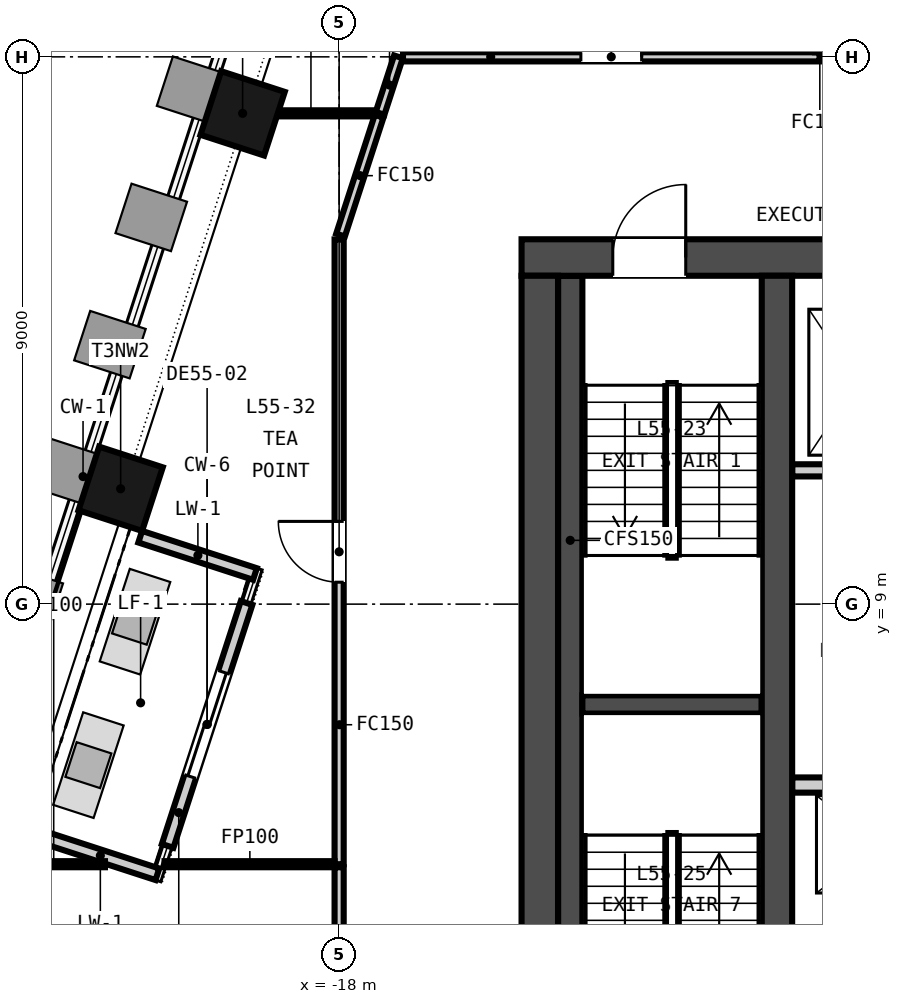
"""IFC4 building model, lengths in metres.
Left out: names, types, materials, properties, quantities, classifications, styles, units other than length and angle.
Written with IfcOpenShell. Run it as: python <this file> out.ifc"""

import sys

from ifc_helpers import new_model, si_unit, direction, frame, frame_2d, origin, origin_2d, place, context, subcontext, project, spatial, rectangle, extrude, element, fill, save


model = new_model("IFC4")
c1 = context("Model", 3, precision=1e-05, world=origin(), true_north=direction((0.0, 1.0)))
c2 = subcontext(c1, "Body", "Model", "MODEL_VIEW")
j1 = project(units=[si_unit("LENGTHUNIT", "METRE"), si_unit("PLANEANGLEUNIT", "RADIAN")], contexts=[c1])
p1 = place(None, origin())
s1 = spatial("IfcSite", under=j1, at=p1, CompositionType="ELEMENT")
p2 = place(p1, origin())
s2 = spatial("IfcBuilding", under=s1, at=p2, CompositionType="ELEMENT")
p3 = place(p2, frame((0.0, 0.0, 219.95)))
s3 = spatial("IfcBuildingStorey", under=s2, at=p3, CompositionType="ELEMENT", Elevation=219.95)
p4 = place(p3, frame((-15.0, 14.7, -0.15), z_axis=(0.0, 0.0, 1.0), x_axis=(1.0, 0.0, 0.0)))
e1 = element("IfcWall", 1, at=p4, inside=s3, PredefinedType="SOLIDWALL", context=c2, shape_type="SweptSolid", body=[
    extrude(rectangle(XDim=30.0, YDim=0.6, at=frame_2d((15.0, 0.0))), origin(), (0.0, 0.0, 1.0), 3.65),
])
p5 = place(p4, frame((9.25, 0.0, 0.15)))
e2 = element("IfcOpeningElement", 2, at=p5, cuts=e1, PredefinedType="OPENING", context=c2, shape_type="SweptSolid", body=[
    extrude(rectangle(XDim=1.5, YDim=2.1, at=frame_2d((0.75, 1.05))), frame((0.0, 0.31, 0.0), z_axis=(0.0, -1.0, 0.0), x_axis=(1.0, 0.0, 0.0)), (0.0, 0.0, 1.0), 0.62),
])
p6 = place(p4, frame((19.4, 0.0, 0.15)))
e3 = element("IfcOpeningElement", 3, at=p6, cuts=e1, PredefinedType="OPENING", context=c2, shape_type="SweptSolid", body=[
    extrude(rectangle(XDim=1.5, YDim=2.1, at=frame_2d((0.75, 1.05))), frame((0.0, 0.31, 0.0), z_axis=(0.0, -1.0, 0.0), x_axis=(1.0, 0.0, 0.0)), (0.0, 0.0, 1.0), 0.62),
])
p7 = place(p4, frame((1.5, 0.0, 0.15)))
e4 = element("IfcOpeningElement", 4, at=p7, cuts=e1, PredefinedType="OPENING", context=c2, shape_type="SweptSolid", body=[
    extrude(rectangle(XDim=1.2, YDim=2.1, at=frame_2d((0.6, 1.05))), frame((0.0, 0.31, 0.0), z_axis=(0.0, -1.0, 0.0), x_axis=(1.0, 0.0, 0.0)), (0.0, 0.0, 1.0), 0.62),
])
p8 = place(p4, frame((27.3, 0.0, 0.15)))
e5 = element("IfcOpeningElement", 5, at=p8, cuts=e1, PredefinedType="OPENING", context=c2, shape_type="SweptSolid", body=[
    extrude(rectangle(XDim=1.2, YDim=2.1, at=frame_2d((0.6, 1.05))), frame((0.0, 0.31, 0.0), z_axis=(0.0, -1.0, 0.0), x_axis=(1.0, 0.0, 0.0)), (0.0, 0.0, 1.0), 0.62),
])
p9 = place(p3, frame((-14.7, 0.6, -0.15), z_axis=(0.0, 0.0, 1.0), x_axis=(0.0, 1.0, 0.0)))
e6 = element("IfcWall", 6, at=p9, inside=s3, PredefinedType="SOLIDWALL", context=c2, shape_type="SweptSolid", body=[
    extrude(rectangle(XDim=13.8, YDim=0.6, at=frame_2d((6.9, 0.0))), origin(), (0.0, 0.0, 1.0), 3.65),
])
p10 = place(p3, frame((-10.8, 0.6, -0.15), z_axis=(0.0, 0.0, 1.0), x_axis=(0.0, 1.0, 0.0)))
e7 = element("IfcWall", 7, at=p10, inside=s3, PredefinedType="SOLIDWALL", context=c2, shape_type="SweptSolid", body=[
    extrude(rectangle(XDim=13.8, YDim=0.5, at=frame_2d((6.9, 0.0))), origin(), (0.0, 0.0, 1.0), 3.65),
])
for number, where, z_axis, x_axis in (
    (8, (-19.587, 17.071, -0.15), (0.0, 0.0, 1.0), (-0.309, -0.951, 0.0)),
    (9, (-21.593, 10.897, -0.15), (0.0, 0.0, 1.0), (-0.309, -0.951, 0.0)),
):
    element("IfcColumn", number, at=place(p3, frame(where, z_axis=z_axis, x_axis=x_axis)), inside=s3, PredefinedType="COLUMN", context=c2, shape_type="SweptSolid", body=[
        extrude(rectangle(XDim=1.1, YDim=1.1, at=origin_2d()), origin(), (0.0, 0.0, 1.0), 3.65),
    ])
p11 = place(p3, frame((-19.522, 9.019, 0.0), z_axis=(0.0, 0.0, 1.0), x_axis=(-0.30901640812, -0.951056706781, 0.0)))
e10 = element("IfcWall", 10, at=p11, inside=s3, PredefinedType="SOLIDWALL", context=c2, shape_type="SweptSolid", body=[
    extrude(rectangle(XDim=4.2, YDim=0.2, at=frame_2d((2.1, 0.0))), origin(), (0.0, 0.0, 1.0), 2.9),
])
p12 = place(p11, frame((1.2, 0.0, 0.0)))
e11 = element("IfcOpeningElement", 11, at=p12, cuts=e10, PredefinedType="OPENING", context=c2, shape_type="SweptSolid", body=[
    extrude(rectangle(XDim=1.8, YDim=2.4, at=frame_2d((0.9, 1.2))), frame((0.0, 0.11, 0.0), z_axis=(0.0, -1.0, 0.0), x_axis=(1.0, 0.0, 0.0)), (0.0, 0.0, 1.0), 0.22),
])
p13 = place(p3, frame((-21.271, 10.109, 0.0), z_axis=(0.0, 0.0, 1.0), x_axis=(0.951019598045, -0.309130593981, 0.0)))
e12 = element("IfcWall", 12, at=p13, inside=s3, PredefinedType="SOLIDWALL", context=c2, shape_type="SweptSolid", body=[
    extrude(rectangle(XDim=1.984, YDim=0.2, at=frame_2d((0.992, 0.0))), origin(), (0.0, 0.0, 1.0), 3.05),
])
p14 = place(p3, frame((-22.875, 5.171, 0.0), z_axis=(0.0, 0.0, 1.0), x_axis=(0.951067521568, -0.308983121576, 0.0)))
e13 = element("IfcWall", 13, at=p14, inside=s3, PredefinedType="SOLIDWALL", context=c2, shape_type="SweptSolid", body=[
    extrude(rectangle(XDim=1.984, YDim=0.2, at=frame_2d((0.992, 0.0))), origin(), (0.0, 0.0, 1.0), 3.05),
])
p15 = place(p3, frame((-10.55, 6.025, 0.0), z_axis=(0.0, 0.0, 1.0), x_axis=(1.0, 0.0, 0.0)))
e14 = element("IfcWall", 14, at=p15, inside=s3, PredefinedType="PARTITIONING", context=c2, shape_type="SweptSolid", body=[
    extrude(rectangle(XDim=21.1, YDim=0.25, at=frame_2d((10.55, 0.0))), origin(), (0.0, 0.0, 1.0), 3.5),
])
p16 = place(p3, frame((-10.55, 11.2, 0.0), z_axis=(0.0, 0.0, 1.0), x_axis=(1.0, 0.0, 0.0)))
e15 = element("IfcWall", 15, at=p16, inside=s3, PredefinedType="PARTITIONING", context=c2, shape_type="SweptSolid", body=[
    extrude(rectangle(XDim=4.8, YDim=0.2, at=frame_2d((2.4, 0.0))), origin(), (0.0, 0.0, 1.0), 3.5),
])
p17 = place(p16, frame((0.525, 0.0, 0.0)))
e16 = element("IfcOpeningElement", 16, at=p17, cuts=e15, PredefinedType="OPENING", context=c2, shape_type="SweptSolid", body=[
    extrude(rectangle(XDim=1.1, YDim=2.1, at=frame_2d((0.55, 1.05))), frame((0.0, 0.11, 0.0), z_axis=(0.0, -1.0, 0.0), x_axis=(1.0, 0.0, 0.0)), (0.0, 0.0, 1.0), 0.22),
])
p18 = place(p16, frame((2.925, 0.0, 0.0)))
e17 = element("IfcOpeningElement", 17, at=p18, cuts=e15, PredefinedType="OPENING", context=c2, shape_type="SweptSolid", body=[
    extrude(rectangle(XDim=1.1, YDim=2.1, at=frame_2d((0.55, 1.05))), frame((0.0, 0.11, 0.0), z_axis=(0.0, -1.0, 0.0), x_axis=(1.0, 0.0, 0.0)), (0.0, 0.0, 1.0), 0.22),
])
p19 = place(p3, frame((-14.0, 7.35, 0.0), z_axis=(0.0, 0.0, 1.0), x_axis=(1.0, 0.0, 0.0)))
e18 = element("IfcWall", 18, at=p19, inside=s3, PredefinedType="SOLIDWALL", context=c2, shape_type="SweptSolid", body=[
    extrude(rectangle(XDim=2.95, YDim=0.3, at=frame_2d((1.475, 0.0))), origin(), (0.0, 0.0, 1.0), 3.5),
])
p20 = place(p3, frame((-14.2, 0.6, 0.0), z_axis=(0.0, 0.0, 1.0), x_axis=(0.0, 1.0, 0.0)))
e19 = element("IfcWall", 19, at=p20, inside=s3, PredefinedType="SOLIDWALL", context=c2, shape_type="SweptSolid", body=[
    extrude(rectangle(XDim=13.8, YDim=0.4, at=frame_2d((6.9, 0.0))), origin(), (0.0, 0.0, 1.0), 3.5),
])
p21 = place(p3, frame((-17.327, 17.071, 0.0), z_axis=(0.0, 0.0, 1.0), x_axis=(0.309170843074, 0.951006514064, 0.0)))
e20 = element("IfcWall", 20, at=p21, inside=s3, PredefinedType="PARTITIONING", context=c2, shape_type="SweptSolid", body=[
    extrude(rectangle(XDim=0.977, YDim=0.15, at=frame_2d((0.488, 0.0))), origin(), (0.0, 0.0, 1.0), 2.751),
])
p22 = place(p3, frame((-16.95, 18.0, 0.0), z_axis=(0.0, 0.0, 1.0), x_axis=(1.0, 0.0, 0.0)))
e21 = element("IfcWall", 21, at=p22, inside=s3, PredefinedType="PARTITIONING", context=c2, shape_type="SweptSolid", body=[
    extrude(rectangle(XDim=6.85, YDim=0.15, at=frame_2d((3.425, 0.0))), origin(), (0.0, 0.0, 1.0), 2.751),
])
p23 = place(p22, frame((2.925, 0.0, 0.0)))
e22 = element("IfcOpeningElement", 22, at=p23, cuts=e21, PredefinedType="OPENING", context=c2, shape_type="SweptSolid", body=[
    extrude(rectangle(XDim=1.0, YDim=2.1, at=frame_2d((0.5, 1.05))), frame((0.0, 0.085, 0.0), z_axis=(0.0, -1.0, 0.0), x_axis=(1.0, 0.0, 0.0)), (0.0, 0.0, 1.0), 0.17),
])
p24 = place(p3, frame((-19.535, 17.071, 0.0), z_axis=(0.0, 0.0, 1.0), x_axis=(1.0, 0.0, 0.0)))
e23 = element("IfcWall", 23, at=p24, inside=s3, PredefinedType="PARTITIONING", context=c2, shape_type="SweptSolid", body=[
    extrude(rectangle(XDim=2.133, YDim=0.1, at=frame_2d((1.066, 0.0))), origin(), (0.0, 0.0, 1.0), 2.751),
])
p25 = place(p3, frame((-18.0, 4.723, 0.0), z_axis=(0.0, 0.0, 1.0), x_axis=(0.0, 1.0, 0.0)))
e24 = element("IfcWall", 24, at=p25, inside=s3, PredefinedType="PARTITIONING", context=c2, shape_type="SweptSolid", body=[
    extrude(rectangle(XDim=10.275, YDim=0.15, at=frame_2d((5.138, 0.0))), origin(), (0.0, 0.0, 1.0), 2.751),
])
p26 = place(p25, frame((4.637, 0.0, 0.0)))
e25 = element("IfcOpeningElement", 25, at=p26, cuts=e24, PredefinedType="OPENING", context=c2, shape_type="SweptSolid", body=[
    extrude(rectangle(XDim=1.0, YDim=2.1, at=frame_2d((0.5, 1.05))), frame((0.0, 0.085, 0.0), z_axis=(0.0, -1.0, 0.0), x_axis=(1.0, 0.0, 0.0)), (0.0, 0.0, 1.0), 0.17),
])
p27 = place(p3, frame((-17.977, 15.069, 0.0), z_axis=(0.0, 0.0, 1.0), x_axis=(0.308838863498, 0.951114376084, 0.0)))
e26 = element("IfcWall", 26, at=p27, inside=s3, PredefinedType="PARTITIONING", context=c2, shape_type="SweptSolid", body=[
    extrude(rectangle(XDim=2.054, YDim=0.15, at=frame_2d((1.027, 0.0))), origin(), (0.0, 0.0, 1.0), 2.751),
])
p28 = place(p3, frame((-23.547, 4.723, 0.0), z_axis=(0.0, 0.0, 1.0), x_axis=(1.0, 0.0, 0.0)))
e27 = element("IfcWall", 27, at=p28, inside=s3, PredefinedType="PARTITIONING", context=c2, shape_type="SweptSolid", body=[
    extrude(rectangle(XDim=1.696, YDim=0.1, at=frame_2d((0.848, 0.0))), origin(), (0.0, 0.0, 1.0), 2.751),
])
p29 = place(p3, frame((-20.871, 4.723, 0.0), z_axis=(0.0, 0.0, 1.0), x_axis=(1.0, 0.0, 0.0)))
e28 = element("IfcWall", 28, at=p29, inside=s3, PredefinedType="PARTITIONING", context=c2, shape_type="SweptSolid", body=[
    extrude(rectangle(XDim=2.796, YDim=0.1, at=frame_2d((1.398, 0.0))), origin(), (0.0, 0.0, 1.0), 2.751),
])
p30 = place(p3, frame((-18.0, -3.125, 0.0), z_axis=(0.0, 0.0, 1.0), x_axis=(0.0, 1.0, 0.0)))
e29 = element("IfcWall", 29, at=p30, inside=s3, PredefinedType="PARTITIONING", context=c2, shape_type="SweptSolid", body=[
    extrude(rectangle(XDim=7.798, YDim=0.15, at=frame_2d((3.899, 0.0))), origin(), (0.0, 0.0, 1.0), 2.751),
])
p31 = place(p30, frame((2.999, 0.0, 0.0)))
e30 = element("IfcOpeningElement", 30, at=p31, cuts=e29, PredefinedType="OPENING", context=c2, shape_type="SweptSolid", body=[
    extrude(rectangle(XDim=1.8, YDim=2.1, at=frame_2d((0.9, 1.05))), frame((0.0, 0.085, 0.0), z_axis=(0.0, -1.0, 0.0), x_axis=(1.0, 0.0, 0.0)), (0.0, 0.0, 1.0), 0.17),
])
p32 = place(p12, origin())
e31 = element("IfcDoor", 31, at=p32, inside=s3, OperationType="SINGLE_SWING_LEFT", PredefinedType="DOOR", context=c2, shape_type="SweptSolid", body=[
    extrude(rectangle(XDim=1.8, YDim=2.4, at=frame_2d((0.9, 1.2))), frame((0.0, 0.025, 0.0), z_axis=(0.0, -1.0, 0.0), x_axis=(1.0, 0.0, 0.0)), (0.0, 0.0, 1.0), 0.05),
])
fill(e11, e31)
p33 = place(p7, origin())
e32 = element("IfcDoor", 32, at=p33, inside=s3, OperationType="SINGLE_SWING_RIGHT", PredefinedType="DOOR", context=c2, shape_type="SweptSolid", body=[
    extrude(rectangle(XDim=1.2, YDim=2.1, at=frame_2d((0.6, 1.05))), frame((0.0, 0.025, 0.0), z_axis=(0.0, -1.0, 0.0), x_axis=(1.0, 0.0, 0.0)), (0.0, 0.0, 1.0), 0.05),
])
fill(e4, e32)
p34 = place(p23, origin())
e33 = element("IfcDoor", 33, at=p34, inside=s3, OperationType="SINGLE_SWING_RIGHT", PredefinedType="DOOR", context=c2, shape_type="SweptSolid", body=[
    extrude(rectangle(XDim=1.0, YDim=2.1, at=frame_2d((0.5, 1.05))), frame((0.0, 0.025, 0.0), z_axis=(0.0, -1.0, 0.0), x_axis=(1.0, 0.0, 0.0)), (0.0, 0.0, 1.0), 0.05),
])
fill(e22, e33)
p35 = place(p26, origin())
e34 = element("IfcDoor", 34, at=p35, inside=s3, OperationType="SINGLE_SWING_RIGHT", PredefinedType="DOOR", context=c2, shape_type="SweptSolid", body=[
    extrude(rectangle(XDim=1.0, YDim=2.1, at=frame_2d((0.5, 1.05))), frame((0.0, 0.025, 0.0), z_axis=(0.0, -1.0, 0.0), x_axis=(1.0, 0.0, 0.0)), (0.0, 0.0, 1.0), 0.05),
])
fill(e25, e34)
save(model, sys.argv[1])
